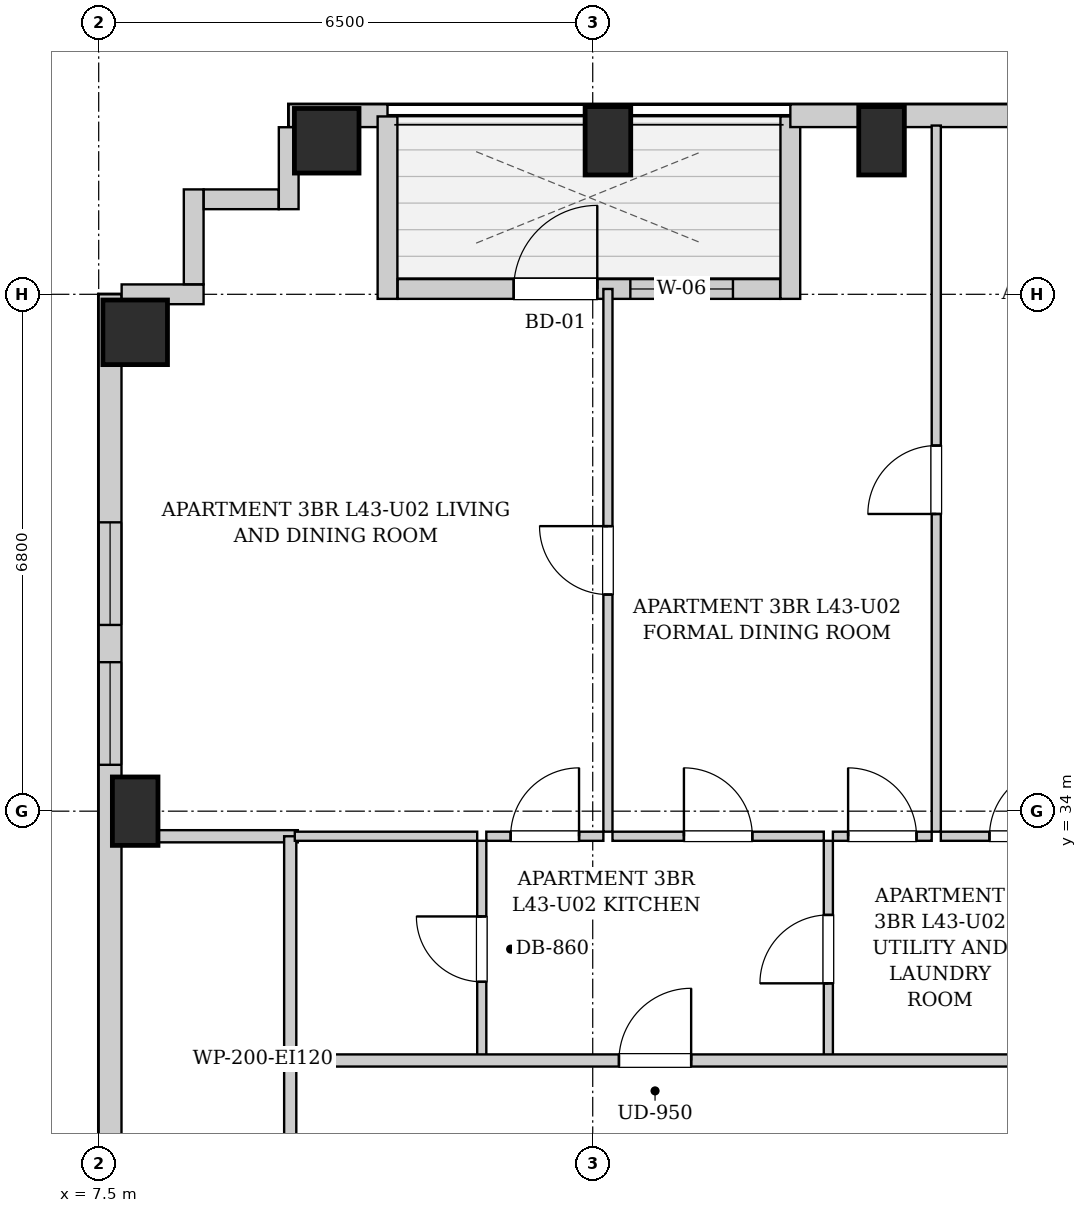
"""IFC4 building model, lengths in metres.
Left out: names, types, materials, properties, quantities, classifications, styles, units other than length and angle.
Written with IfcOpenShell. Run it as: python <this file> out.ifc"""

import sys

from ifc_helpers import new_model, si_unit, direction, frame, frame_2d, origin, origin_2d, place, context, subcontext, project, spatial, rectangle, extrude, element, fill, save


model = new_model("IFC4")
c1 = context("Model", 3, precision=1e-05, world=origin(), true_north=direction((0.0, 1.0)))
c2 = subcontext(c1, "Body", "Model", "MODEL_VIEW")
j1 = project(units=[si_unit("LENGTHUNIT", "METRE"), si_unit("PLANEANGLEUNIT", "RADIAN")], contexts=[c1])
p1 = place(None, origin())
s1 = spatial("IfcSite", under=j1, at=p1, CompositionType="ELEMENT")
p2 = place(p1, origin())
s2 = spatial("IfcBuilding", under=s1, at=p2, CompositionType="ELEMENT")
p3 = place(p2, frame((0.0, 0.0, 150.4)))
s3 = spatial("IfcBuildingStorey", under=s2, at=p3, CompositionType="ELEMENT", Elevation=150.4)
p4 = place(p3, frame((10.5, 42.82, 0.0), z_axis=(0.0, 0.0, 1.0), x_axis=(1.0, 0.0, 0.0)))
e1 = element("IfcColumn", 1, at=p4, inside=s3, PredefinedType="COLUMN", context=c2, shape_type="SweptSolid", body=[
    extrude(rectangle(XDim=0.85, YDim=0.85, at=origin_2d()), origin(), (0.0, 0.0, 1.0), 3.25),
])
for number, where, z_axis, x_axis in (
    (2, (14.2, 42.82, 0.0), (0.0, 0.0, 1.0), (1.0, 0.0, 0.0)),
    (3, (17.8, 42.82, 0.0), (0.0, 0.0, 1.0), (1.0, 0.0, 0.0)),
    (4, (7.98, 34.0, 0.0), (0.0, 0.0, 1.0), (1.0, 0.0, 0.0)),
):
    element("IfcColumn", number, at=place(p3, frame(where, z_axis=z_axis, x_axis=x_axis)), inside=s3, PredefinedType="COLUMN", context=c2, shape_type="SweptSolid", body=[
        extrude(rectangle(XDim=0.6, YDim=0.9, at=origin_2d()), origin(), (0.0, 0.0, 1.0), 3.25),
    ])
p5 = place(p3, frame((7.98, 40.3, 0.0), z_axis=(0.0, 0.0, 1.0), x_axis=(1.0, 0.0, 0.0)))
e5 = element("IfcColumn", 5, at=p5, inside=s3, PredefinedType="COLUMN", context=c2, shape_type="SweptSolid", body=[
    extrude(rectangle(XDim=0.85, YDim=0.85, at=origin_2d()), origin(), (0.0, 0.0, 1.0), 3.25),
])
p6 = place(p3, frame((10.0, 43.15, 0.0), z_axis=(0.0, 0.0, 1.0), x_axis=(1.0, 0.0, 0.0)))
e6 = element("IfcWall", 6, at=p6, inside=s3, PredefinedType="SOLIDWALL", context=c2, shape_type="SweptSolid", body=[
    extrude(rectangle(XDim=1.3, YDim=0.3, at=frame_2d((0.65, 0.0))), origin(), (0.0, 0.0, 1.0), 2.99),
])
p7 = place(p3, frame((11.3, 43.14, 0.0), z_axis=(0.0, 0.0, 1.0), x_axis=(0.0, -1.0, 0.0)))
e7 = element("IfcWall", 7, at=p7, inside=s3, PredefinedType="SOLIDWALL", context=c2, shape_type="SweptSolid", body=[
    extrude(rectangle(XDim=2.4, YDim=0.26, at=frame_2d((1.2, 0.0))), origin(), (0.0, 0.0, 1.0), 2.99),
])
p8 = place(p3, frame((11.434, 40.87, 0.0), z_axis=(0.0, 0.0, 1.0), x_axis=(1.0, 0.0, 0.0)))
e8 = element("IfcWall", 8, at=p8, inside=s3, PredefinedType="SOLIDWALL", context=c2, shape_type="SweptSolid", body=[
    extrude(rectangle(XDim=5.032, YDim=0.26, at=frame_2d((2.516, 0.0))), origin(), (0.0, 0.0, 1.0), 2.99),
])
p9 = place(p8, frame((1.526, 0.0, 0.0)))
e9 = element("IfcOpeningElement", 9, at=p9, cuts=e8, PredefinedType="OPENING", context=c2, shape_type="SweptSolid", body=[
    extrude(rectangle(XDim=1.1, YDim=2.0, at=frame_2d((0.55, 1.0))), frame((0.0, 0.14, 0.0), z_axis=(0.0, -1.0, 0.0), x_axis=(1.0, 0.0, 0.0)), (0.0, 0.0, 1.0), 0.28),
])
p10 = place(p8, frame((3.061, 0.0, 0.85)))
e10 = element("IfcOpeningElement", 10, at=p10, cuts=e8, PredefinedType="OPENING", context=c2, shape_type="SweptSolid", body=[
    extrude(rectangle(XDim=1.35, YDim=1.65, at=frame_2d((0.675, 0.825))), frame((0.0, 0.14, 0.0), z_axis=(0.0, -1.0, 0.0), x_axis=(1.0, 0.0, 0.0)), (0.0, 0.0, 1.0), 0.28),
])
p11 = place(p3, frame((16.6, 40.74, 0.0), z_axis=(0.0, 0.0, 1.0), x_axis=(0.0, 1.0, 0.0)))
e11 = element("IfcWall", 11, at=p11, inside=s3, PredefinedType="SOLIDWALL", context=c2, shape_type="SweptSolid", body=[
    extrude(rectangle(XDim=2.4, YDim=0.26, at=frame_2d((1.2, 0.0))), origin(), (0.0, 0.0, 1.0), 2.99),
])
p12 = place(p3, frame((16.6, 43.15, 0.0), z_axis=(0.0, 0.0, 1.0), x_axis=(1.0, 0.0, 0.0)))
e12 = element("IfcWall", 12, at=p12, inside=s3, PredefinedType="SOLIDWALL", context=c2, shape_type="SweptSolid", body=[
    extrude(rectangle(XDim=13.35, YDim=0.3, at=frame_2d((6.675, 0.0))), origin(), (0.0, 0.0, 1.0), 2.99),
])
p13 = place(p12, frame((3.269, 0.0, 0.55)))
e13 = element("IfcOpeningElement", 13, at=p13, cuts=e12, PredefinedType="OPENING", context=c2, shape_type="SweptSolid", body=[
    extrude(rectangle(XDim=1.35, YDim=1.2, at=frame_2d((0.675, 0.6))), frame((0.0, 0.16, 0.0), z_axis=(0.0, -1.0, 0.0), x_axis=(1.0, 0.0, 0.0)), (0.0, 0.0, 1.0), 0.32),
])
p14 = place(p12, frame((10.93, 0.0, 0.55)))
e14 = element("IfcOpeningElement", 14, at=p14, cuts=e12, PredefinedType="OPENING", context=c2, shape_type="SweptSolid", body=[
    extrude(rectangle(XDim=1.35, YDim=1.2, at=frame_2d((0.675, 0.6))), frame((0.0, 0.16, 0.0), z_axis=(0.0, -1.0, 0.0), x_axis=(1.0, 0.0, 0.0)), (0.0, 0.0, 1.0), 0.32),
])
p15 = place(p3, frame((7.65, 6.3, 0.0), z_axis=(0.0, 0.0, 1.0), x_axis=(0.0, 1.0, 0.0)))
e15 = element("IfcWall", 15, at=p15, inside=s3, PredefinedType="SOLIDWALL", context=c2, shape_type="SweptSolid", body=[
    extrude(rectangle(XDim=34.5, YDim=0.3, at=frame_2d((17.25, 0.0))), origin(), (0.0, 0.0, 1.0), 2.99),
])
p16 = place(p15, frame((1.425, 0.0, 0.55)))
e16 = element("IfcOpeningElement", 16, at=p16, cuts=e15, PredefinedType="OPENING", context=c2, shape_type="SweptSolid", body=[
    extrude(rectangle(XDim=1.35, YDim=1.2, at=frame_2d((0.675, 0.6))), frame((0.0, 0.16, 0.0), z_axis=(0.0, -1.0, 0.0), x_axis=(1.0, 0.0, 0.0)), (0.0, 0.0, 1.0), 0.32),
])
p17 = place(p15, frame((30.15, 0.0, 0.55)))
e17 = element("IfcOpeningElement", 17, at=p17, cuts=e15, PredefinedType="OPENING", context=c2, shape_type="SweptSolid", body=[
    extrude(rectangle(XDim=1.35, YDim=1.2, at=frame_2d((0.675, 0.6))), frame((0.0, 0.16, 0.0), z_axis=(0.0, -1.0, 0.0), x_axis=(1.0, 0.0, 0.0)), (0.0, 0.0, 1.0), 0.32),
])
p18 = place(p15, frame((28.31, 0.0, 0.55)))
e18 = element("IfcOpeningElement", 18, at=p18, cuts=e15, PredefinedType="OPENING", context=c2, shape_type="SweptSolid", body=[
    extrude(rectangle(XDim=1.35, YDim=1.2, at=frame_2d((0.675, 0.6))), frame((0.0, 0.16, 0.0), z_axis=(0.0, -1.0, 0.0), x_axis=(1.0, 0.0, 0.0)), (0.0, 0.0, 1.0), 0.32),
])
p19 = place(p15, frame((10.35, 0.0, 0.55)))
e19 = element("IfcOpeningElement", 19, at=p19, cuts=e15, PredefinedType="OPENING", context=c2, shape_type="SweptSolid", body=[
    extrude(rectangle(XDim=1.35, YDim=1.2, at=frame_2d((0.675, 0.6))), frame((0.0, 0.16, 0.0), z_axis=(0.0, -1.0, 0.0), x_axis=(1.0, 0.0, 0.0)), (0.0, 0.0, 1.0), 0.32),
])
p20 = place(p15, frame((19.725, 0.0, 0.55)))
e20 = element("IfcOpeningElement", 20, at=p20, cuts=e15, PredefinedType="OPENING", context=c2, shape_type="SweptSolid", body=[
    extrude(rectangle(XDim=1.35, YDim=1.2, at=frame_2d((0.675, 0.6))), frame((0.0, 0.16, 0.0), z_axis=(0.0, -1.0, 0.0), x_axis=(1.0, 0.0, 0.0)), (0.0, 0.0, 1.0), 0.32),
])
p21 = place(p3, frame((7.802, 40.8, 0.0), z_axis=(0.0, 0.0, 1.0), x_axis=(1.0, 0.0, 0.0)))
e21 = element("IfcWall", 21, at=p21, inside=s3, PredefinedType="SOLIDWALL", context=c2, shape_type="SweptSolid", body=[
    extrude(rectangle(XDim=1.078, YDim=0.26, at=frame_2d((0.539, 0.0))), origin(), (0.0, 0.0, 1.0), 2.99),
])
p22 = place(p3, frame((8.75, 40.932, 0.0), z_axis=(0.0, 0.0, 1.0), x_axis=(0.0, 1.0, 0.0)))
e22 = element("IfcWall", 22, at=p22, inside=s3, PredefinedType="SOLIDWALL", context=c2, shape_type="SweptSolid", body=[
    extrude(rectangle(XDim=1.248, YDim=0.26, at=frame_2d((0.624, 0.0))), origin(), (0.0, 0.0, 1.0), 2.99),
])
p23 = place(p3, frame((8.882, 42.05, 0.0), z_axis=(0.0, 0.0, 1.0), x_axis=(1.0, 0.0, 0.0)))
e23 = element("IfcWall", 23, at=p23, inside=s3, PredefinedType="SOLIDWALL", context=c2, shape_type="SweptSolid", body=[
    extrude(rectangle(XDim=0.986, YDim=0.26, at=frame_2d((0.493, 0.0))), origin(), (0.0, 0.0, 1.0), 2.99),
])
p24 = place(p3, frame((10.0, 41.92, 0.0), z_axis=(0.0, 0.0, 1.0), x_axis=(0.0, 1.0, 0.0)))
e24 = element("IfcWall", 24, at=p24, inside=s3, PredefinedType="SOLIDWALL", context=c2, shape_type="SweptSolid", body=[
    extrude(rectangle(XDim=1.078, YDim=0.26, at=frame_2d((0.539, 0.0))), origin(), (0.0, 0.0, 1.0), 2.99),
])
p25 = place(p3, frame((10.02, 28.98, 0.0), z_axis=(0.0, 0.0, 1.0), x_axis=(0.0, 1.0, 0.0)))
e25 = element("IfcWall", 25, at=p25, inside=s3, PredefinedType="PARTITIONING", context=c2, shape_type="SweptSolid", body=[
    extrude(rectangle(XDim=1.74, YDim=0.16, at=frame_2d((0.87, 0.0))), origin(), (0.0, 0.0, 1.0), 2.99),
])
p26 = place(p3, frame((7.78, 33.67, 0.0), z_axis=(0.0, 0.0, 1.0), x_axis=(1.0, 0.0, 0.0)))
e26 = element("IfcWall", 26, at=p26, inside=s3, PredefinedType="PARTITIONING", context=c2, shape_type="SweptSolid", body=[
    extrude(rectangle(XDim=2.34, YDim=0.16, at=frame_2d((1.17, 0.0))), origin(), (0.0, 0.0, 1.0), 2.99),
])
p27 = place(p3, frame((10.02, 30.76, 0.0), z_axis=(0.0, 0.0, 1.0), x_axis=(0.0, 1.0, 0.0)))
e27 = element("IfcWall", 27, at=p27, inside=s3, PredefinedType="PARTITIONING", context=c2, shape_type="SweptSolid", body=[
    extrude(rectangle(XDim=2.91, YDim=0.16, at=frame_2d((1.455, 0.0))), origin(), (0.0, 0.0, 1.0), 2.99),
])
p28 = place(p3, frame((12.54, 30.76, 0.0), z_axis=(0.0, 0.0, 1.0), x_axis=(0.0, 1.0, 0.0)))
e28 = element("IfcWall", 28, at=p28, inside=s3, PredefinedType="PARTITIONING", context=c2, shape_type="SweptSolid", body=[
    extrude(rectangle(XDim=2.85, YDim=0.12, at=frame_2d((1.425, 0.0))), origin(), (0.0, 0.0, 1.0), 2.99),
])
p29 = place(p28, frame((0.995, 0.0, 0.0)))
e29 = element("IfcOpeningElement", 29, at=p29, cuts=e28, PredefinedType="OPENING", context=c2, shape_type="SweptSolid", body=[
    extrude(rectangle(XDim=0.86, YDim=2.05, at=frame_2d((0.43, 1.025))), frame((0.0, 0.07, 0.0), z_axis=(0.0, -1.0, 0.0), x_axis=(1.0, 0.0, 0.0)), (0.0, 0.0, 1.0), 0.14),
])
p30 = place(p3, frame((10.08, 33.67, 0.0), z_axis=(0.0, 0.0, 1.0), x_axis=(1.0, 0.0, 0.0)))
e30 = element("IfcWall", 30, at=p30, inside=s3, PredefinedType="PARTITIONING", context=c2, shape_type="SweptSolid", body=[
    extrude(rectangle(XDim=2.4, YDim=0.12, at=frame_2d((1.2, 0.0))), origin(), (0.0, 0.0, 1.0), 2.99),
])
p31 = place(p3, frame((17.1, 30.76, 0.0), z_axis=(0.0, 0.0, 1.0), x_axis=(0.0, 1.0, 0.0)))
e31 = element("IfcWall", 31, at=p31, inside=s3, PredefinedType="PARTITIONING", context=c2, shape_type="SweptSolid", body=[
    extrude(rectangle(XDim=2.85, YDim=0.12, at=frame_2d((1.425, 0.0))), origin(), (0.0, 0.0, 1.0), 2.99),
])
p32 = place(p31, frame((0.975, 0.0, 0.0)))
e32 = element("IfcOpeningElement", 32, at=p32, cuts=e31, PredefinedType="OPENING", context=c2, shape_type="SweptSolid", body=[
    extrude(rectangle(XDim=0.9, YDim=2.05, at=frame_2d((0.45, 1.025))), frame((0.0, 0.07, 0.0), z_axis=(0.0, -1.0, 0.0), x_axis=(1.0, 0.0, 0.0)), (0.0, 0.0, 1.0), 0.14),
])
p33 = place(p3, frame((12.6, 33.67, 0.0), z_axis=(0.0, 0.0, 1.0), x_axis=(1.0, 0.0, 0.0)))
e33 = element("IfcWall", 33, at=p33, inside=s3, PredefinedType="PARTITIONING", context=c2, shape_type="SweptSolid", body=[
    extrude(rectangle(XDim=1.54, YDim=0.12, at=frame_2d((0.77, 0.0))), origin(), (0.0, 0.0, 1.0), 2.99),
])
p34 = place(p33, frame((0.32, 0.0, 0.0)))
e34 = element("IfcOpeningElement", 34, at=p34, cuts=e33, PredefinedType="OPENING", context=c2, shape_type="SweptSolid", body=[
    extrude(rectangle(XDim=0.9, YDim=2.05, at=frame_2d((0.45, 1.025))), frame((0.0, 0.07, 0.0), z_axis=(0.0, -1.0, 0.0), x_axis=(1.0, 0.0, 0.0)), (0.0, 0.0, 1.0), 0.14),
])
p35 = place(p3, frame((14.26, 33.67, 0.0), z_axis=(0.0, 0.0, 1.0), x_axis=(1.0, 0.0, 0.0)))
e35 = element("IfcWall", 35, at=p35, inside=s3, PredefinedType="PARTITIONING", context=c2, shape_type="SweptSolid", body=[
    extrude(rectangle(XDim=2.78, YDim=0.12, at=frame_2d((1.39, 0.0))), origin(), (0.0, 0.0, 1.0), 2.99),
])
p36 = place(p35, frame((0.94, 0.0, 0.0)))
e36 = element("IfcOpeningElement", 36, at=p36, cuts=e35, PredefinedType="OPENING", context=c2, shape_type="SweptSolid", body=[
    extrude(rectangle(XDim=0.9, YDim=2.05, at=frame_2d((0.45, 1.025))), frame((0.0, 0.07, 0.0), z_axis=(0.0, -1.0, 0.0), x_axis=(1.0, 0.0, 0.0)), (0.0, 0.0, 1.0), 0.14),
])
p37 = place(p3, frame((17.16, 33.67, 0.0), z_axis=(0.0, 0.0, 1.0), x_axis=(1.0, 0.0, 0.0)))
e37 = element("IfcWall", 37, at=p37, inside=s3, PredefinedType="PARTITIONING", context=c2, shape_type="SweptSolid", body=[
    extrude(rectangle(XDim=1.3, YDim=0.12, at=frame_2d((0.65, 0.0))), origin(), (0.0, 0.0, 1.0), 2.99),
])
p38 = place(p37, frame((0.2, 0.0, 0.0)))
e38 = element("IfcOpeningElement", 38, at=p38, cuts=e37, PredefinedType="OPENING", context=c2, shape_type="SweptSolid", body=[
    extrude(rectangle(XDim=0.9, YDim=2.05, at=frame_2d((0.45, 1.025))), frame((0.0, 0.07, 0.0), z_axis=(0.0, -1.0, 0.0), x_axis=(1.0, 0.0, 0.0)), (0.0, 0.0, 1.0), 0.14),
])
p39 = place(p3, frame((18.58, 33.67, 0.0), z_axis=(0.0, 0.0, 1.0), x_axis=(1.0, 0.0, 0.0)))
e39 = element("IfcWall", 39, at=p39, inside=s3, PredefinedType="PARTITIONING", context=c2, shape_type="SweptSolid", body=[
    extrude(rectangle(XDim=2.18, YDim=0.12, at=frame_2d((1.09, 0.0))), origin(), (0.0, 0.0, 1.0), 2.99),
])
p40 = place(p39, frame((0.64, 0.0, 0.0)))
e40 = element("IfcOpeningElement", 40, at=p40, cuts=e39, PredefinedType="OPENING", context=c2, shape_type="SweptSolid", body=[
    extrude(rectangle(XDim=0.9, YDim=2.05, at=frame_2d((0.45, 1.025))), frame((0.0, 0.07, 0.0), z_axis=(0.0, -1.0, 0.0), x_axis=(1.0, 0.0, 0.0)), (0.0, 0.0, 1.0), 0.14),
])
p41 = place(p3, frame((14.2, 33.73, 0.0), z_axis=(0.0, 0.0, 1.0), x_axis=(0.0, 1.0, 0.0)))
e41 = element("IfcWall", 41, at=p41, inside=s3, PredefinedType="PARTITIONING", context=c2, shape_type="SweptSolid", body=[
    extrude(rectangle(XDim=7.14, YDim=0.12, at=frame_2d((3.57, 0.0))), origin(), (0.0, 0.0, 1.0), 2.99),
])
p42 = place(p41, frame((3.12, 0.0, 0.0)))
e42 = element("IfcOpeningElement", 42, at=p42, cuts=e41, PredefinedType="OPENING", context=c2, shape_type="SweptSolid", body=[
    extrude(rectangle(XDim=0.9, YDim=2.05, at=frame_2d((0.45, 1.025))), frame((0.0, 0.07, 0.0), z_axis=(0.0, -1.0, 0.0), x_axis=(1.0, 0.0, 0.0)), (0.0, 0.0, 1.0), 0.14),
])
p43 = place(p3, frame((18.52, 33.73, 0.0), z_axis=(0.0, 0.0, 1.0), x_axis=(0.0, 1.0, 0.0)))
e43 = element("IfcWall", 43, at=p43, inside=s3, PredefinedType="PARTITIONING", context=c2, shape_type="SweptSolid", body=[
    extrude(rectangle(XDim=9.29, YDim=0.12, at=frame_2d((4.645, 0.0))), origin(), (0.0, 0.0, 1.0), 2.99),
])
p44 = place(p43, frame((4.18, 0.0, 0.0)))
e44 = element("IfcOpeningElement", 44, at=p44, cuts=e43, PredefinedType="OPENING", context=c2, shape_type="SweptSolid", body=[
    extrude(rectangle(XDim=0.9, YDim=2.05, at=frame_2d((0.45, 1.025))), frame((0.0, 0.07, 0.0), z_axis=(0.0, -1.0, 0.0), x_axis=(1.0, 0.0, 0.0)), (0.0, 0.0, 1.0), 0.14),
])
p45 = place(p3, frame((10.05, 30.72, 0.0), z_axis=(0.0, 0.0, 1.0), x_axis=(1.0, 0.0, 0.0)))
e45 = element("IfcWall", 45, at=p45, inside=s3, PredefinedType="PARTITIONING", context=c2, shape_type="SweptSolid", body=[
    extrude(rectangle(XDim=27.7, YDim=0.16, at=frame_2d((13.85, 0.0))), origin(), (0.0, 0.0, 1.0), 2.99),
])
p46 = place(p45, frame((4.295, 0.0, 0.0)))
e46 = element("IfcOpeningElement", 46, at=p46, cuts=e45, PredefinedType="OPENING", context=c2, shape_type="SweptSolid", body=[
    extrude(rectangle(XDim=0.95, YDim=2.1, at=frame_2d((0.475, 1.05))), frame((0.0, 0.09, 0.0), z_axis=(0.0, -1.0, 0.0), x_axis=(1.0, 0.0, 0.0)), (0.0, 0.0, 1.0), 0.18),
])
p47 = place(p29, origin())
e47 = element("IfcDoor", 47, at=p47, inside=s3, OperationType="SINGLE_SWING_RIGHT", PredefinedType="DOOR", context=c2, shape_type="SweptSolid", body=[
    extrude(rectangle(XDim=0.86, YDim=2.05, at=frame_2d((0.43, 1.025))), frame((0.0, 0.025, 0.0), z_axis=(0.0, -1.0, 0.0), x_axis=(1.0, 0.0, 0.0)), (0.0, 0.0, 1.0), 0.05),
])
fill(e29, e47)
p48 = place(p32, origin())
e48 = element("IfcDoor", 48, at=p48, inside=s3, OperationType="SINGLE_SWING_LEFT", PredefinedType="DOOR", context=c2, shape_type="SweptSolid", body=[
    extrude(rectangle(XDim=0.9, YDim=2.05, at=frame_2d((0.45, 1.025))), frame((0.0, 0.025, 0.0), z_axis=(0.0, -1.0, 0.0), x_axis=(1.0, 0.0, 0.0)), (0.0, 0.0, 1.0), 0.05),
])
fill(e32, e48)
p49 = place(p34, origin())
e49 = element("IfcDoor", 49, at=p49, inside=s3, OperationType="SINGLE_SWING_RIGHT", PredefinedType="DOOR", context=c2, shape_type="SweptSolid", body=[
    extrude(rectangle(XDim=0.9, YDim=2.05, at=frame_2d((0.45, 1.025))), frame((0.0, 0.025, 0.0), z_axis=(0.0, -1.0, 0.0), x_axis=(1.0, 0.0, 0.0)), (0.0, 0.0, 1.0), 0.05),
])
fill(e34, e49)
p50 = place(p36, origin())
e50 = element("IfcDoor", 50, at=p50, inside=s3, OperationType="SINGLE_SWING_LEFT", PredefinedType="DOOR", context=c2, shape_type="SweptSolid", body=[
    extrude(rectangle(XDim=0.9, YDim=2.05, at=frame_2d((0.45, 1.025))), frame((0.0, 0.025, 0.0), z_axis=(0.0, -1.0, 0.0), x_axis=(1.0, 0.0, 0.0)), (0.0, 0.0, 1.0), 0.05),
])
fill(e36, e50)
p51 = place(p38, origin())
e51 = element("IfcDoor", 51, at=p51, inside=s3, OperationType="SINGLE_SWING_LEFT", PredefinedType="DOOR", context=c2, shape_type="SweptSolid", body=[
    extrude(rectangle(XDim=0.9, YDim=2.05, at=frame_2d((0.45, 1.025))), frame((0.0, 0.025, 0.0), z_axis=(0.0, -1.0, 0.0), x_axis=(1.0, 0.0, 0.0)), (0.0, 0.0, 1.0), 0.05),
])
fill(e38, e51)
p52 = place(p40, origin())
e52 = element("IfcDoor", 52, at=p52, inside=s3, OperationType="SINGLE_SWING_RIGHT", PredefinedType="DOOR", context=c2, shape_type="SweptSolid", body=[
    extrude(rectangle(XDim=0.9, YDim=2.05, at=frame_2d((0.45, 1.025))), frame((0.0, 0.025, 0.0), z_axis=(0.0, -1.0, 0.0), x_axis=(1.0, 0.0, 0.0)), (0.0, 0.0, 1.0), 0.05),
])
fill(e40, e52)
p53 = place(p42, origin())
e53 = element("IfcDoor", 53, at=p53, inside=s3, OperationType="SINGLE_SWING_RIGHT", PredefinedType="DOOR", context=c2, shape_type="SweptSolid", body=[
    extrude(rectangle(XDim=0.9, YDim=2.05, at=frame_2d((0.45, 1.025))), frame((0.0, 0.025, 0.0), z_axis=(0.0, -1.0, 0.0), x_axis=(1.0, 0.0, 0.0)), (0.0, 0.0, 1.0), 0.05),
])
fill(e42, e53)
p54 = place(p44, origin())
e54 = element("IfcDoor", 54, at=p54, inside=s3, OperationType="SINGLE_SWING_LEFT", PredefinedType="DOOR", context=c2, shape_type="SweptSolid", body=[
    extrude(rectangle(XDim=0.9, YDim=2.05, at=frame_2d((0.45, 1.025))), frame((0.0, 0.025, 0.0), z_axis=(0.0, -1.0, 0.0), x_axis=(1.0, 0.0, 0.0)), (0.0, 0.0, 1.0), 0.05),
])
fill(e44, e54)
p55 = place(p46, origin())
e55 = element("IfcDoor", 55, at=p55, inside=s3, OperationType="SINGLE_SWING_RIGHT", PredefinedType="DOOR", context=c2, shape_type="SweptSolid", body=[
    extrude(rectangle(XDim=0.95, YDim=2.1, at=frame_2d((0.475, 1.05))), frame((0.0, 0.025, 0.0), z_axis=(0.0, -1.0, 0.0), x_axis=(1.0, 0.0, 0.0)), (0.0, 0.0, 1.0), 0.05),
])
fill(e46, e55)
p56 = place(p9, origin())
e56 = element("IfcDoor", 56, at=p56, inside=s3, OperationType="SINGLE_SWING_RIGHT", PredefinedType="DOOR", context=c2, shape_type="SweptSolid", body=[
    extrude(rectangle(XDim=1.1, YDim=2.0, at=frame_2d((0.55, 1.0))), frame((0.0, 0.025, 0.0), z_axis=(0.0, -1.0, 0.0), x_axis=(1.0, 0.0, 0.0)), (0.0, 0.0, 1.0), 0.05),
])
fill(e9, e56)
p57 = place(p17, origin())
e57 = element("IfcWindow", 57, at=p57, inside=s3, PartitioningType="SINGLE_PANEL", PredefinedType="WINDOW", context=c2, shape_type="SweptSolid", body=[
    extrude(rectangle(XDim=1.35, YDim=1.2, at=frame_2d((0.675, 0.6))), frame((0.0, 0.03, 0.0), z_axis=(0.0, -1.0, 0.0), x_axis=(1.0, 0.0, 0.0)), (0.0, 0.0, 1.0), 0.06),
])
fill(e17, e57)
p58 = place(p18, origin())
e58 = element("IfcWindow", 58, at=p58, inside=s3, PartitioningType="SINGLE_PANEL", PredefinedType="WINDOW", context=c2, shape_type="SweptSolid", body=[
    extrude(rectangle(XDim=1.35, YDim=1.2, at=frame_2d((0.675, 0.6))), frame((0.0, 0.03, 0.0), z_axis=(0.0, -1.0, 0.0), x_axis=(1.0, 0.0, 0.0)), (0.0, 0.0, 1.0), 0.06),
])
fill(e18, e58)
p59 = place(p10, origin())
e59 = element("IfcWindow", 59, at=p59, inside=s3, PartitioningType="SINGLE_PANEL", PredefinedType="WINDOW", context=c2, shape_type="SweptSolid", body=[
    extrude(rectangle(XDim=1.35, YDim=1.65, at=frame_2d((0.675, 0.825))), frame((0.0, 0.03, 0.0), z_axis=(0.0, -1.0, 0.0), x_axis=(1.0, 0.0, 0.0)), (0.0, 0.0, 1.0), 0.06),
])
fill(e10, e59)
save(model, sys.argv[1])
